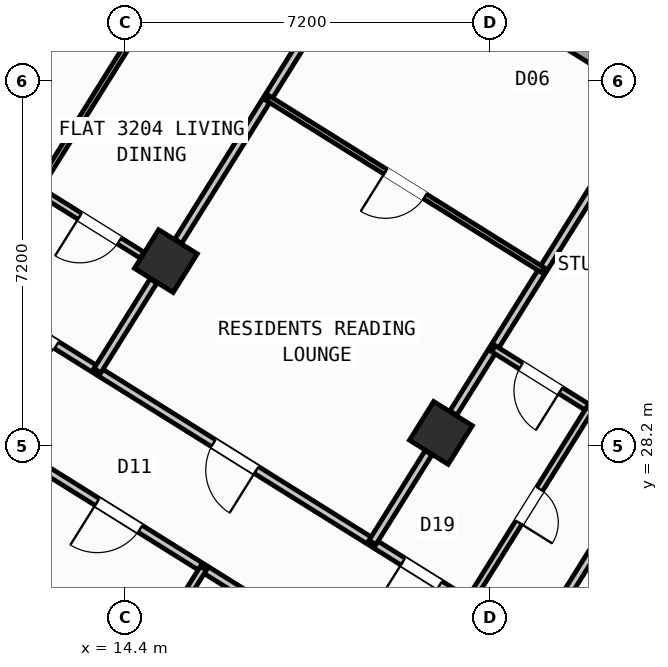
"""IFC4 building model, lengths in metres.
Left out: names, types, materials, properties, quantities, classifications, styles, units other than length and angle.
Written with IfcOpenShell. Run it as: python <this file> out.ifc"""

import sys

from ifc_helpers import new_model, si_unit, direction, frame, frame_2d, origin, origin_2d, place, context, subcontext, project, spatial, rectangle, hollow_rectangle, extrude, source, transform, mapped, element, fill, save


model = new_model("IFC4")
c1 = context("Model", 3, precision=1e-05, world=origin(), true_north=direction((0.0, 1.0)))
c2 = subcontext(c1, "Body", "Model", "MODEL_VIEW")
j1 = project(units=[si_unit("LENGTHUNIT", "METRE"), si_unit("PLANEANGLEUNIT", "RADIAN")], contexts=[c1])
p1 = place(None, origin())
s1 = spatial("IfcSite", under=j1, at=p1, CompositionType="ELEMENT")
p2 = place(p1, origin())
s2 = spatial("IfcBuilding", under=s1, at=p2, CompositionType="ELEMENT")
p3 = place(p2, frame((0.0, 0.0, 127.8)))
s3 = spatial("IfcBuildingStorey", under=s2, at=p3, CompositionType="ELEMENT", Elevation=127.8)
m1 = source(origin(), c2, "Body", "SweptSolid", [
    extrude(hollow_rectangle(XDim=0.9, YDim=0.9, WallThickness=0.036, at=origin_2d()), origin(), (0.0, 0.0, 1.0), 4.8),
])
for number, where, z_axis, x_axis in (
    (1, (20.632, 28.452, 0.0), (0.0, 0.0, 1.0), (-0.848, 0.53, 0.0)),
    (2, (15.205, 31.844, 0.0), (0.0, 0.0, 1.0), (-0.848, 0.53, 0.0)),
):
    element("IfcColumn", number, at=place(p3, frame(where, z_axis=z_axis, x_axis=x_axis)), inside=s3, PredefinedType="COLUMN", context=c2, shape_type="MappedRepresentation", body=[
        mapped(m1, transform((0.0, 0.0, 0.0), scale=1.0)),
    ])
p4 = place(p3, frame((2.415, 23.452, 0.0), z_axis=(0.0, 0.0, 1.0), x_axis=(0.52991049553, 0.848053575387, 0.0)))
e3 = element("IfcWall", 3, at=p4, inside=s3, PredefinedType="STANDARD", context=c2, shape_type="SweptSolid", body=[
    extrude(rectangle(XDim=21.587, YDim=0.32, at=frame_2d((10.794, 0.0))), origin(), (0.0, 0.0, 1.0), 3.975),
])
p5 = place(p4, frame((16.344, 0.0, 0.75)))
e4 = element("IfcOpeningElement", 4, at=p5, cuts=e3, PredefinedType="OPENING", context=c2, shape_type="SweptSolid", body=[
    extrude(rectangle(XDim=2.4, YDim=1.6, at=frame_2d((1.2, 0.8))), frame((0.0, 0.17, 0.0), z_axis=(0.0, -1.0, 0.0), x_axis=(1.0, 0.0, 0.0)), (0.0, 0.0, 1.0), 0.34),
])
p6 = place(p3, frame((14.138, 41.825, 0.0), z_axis=(0.0, 0.0, 1.0), x_axis=(0.848046498049, -0.529921821731, 0.0)))
e5 = element("IfcWall", 5, at=p6, inside=s3, PredefinedType="STANDARD", context=c2, shape_type="SweptSolid", body=[
    extrude(rectangle(XDim=31.588, YDim=0.32, at=frame_2d((15.794, 0.0))), origin(), (0.0, 0.0, 1.0), 4.55),
])
p7 = place(p6, frame((9.69, 0.0, 0.0)))
e6 = element("IfcOpeningElement", 6, at=p7, cuts=e5, PredefinedType="OPENING", context=c2, shape_type="SweptSolid", body=[
    extrude(rectangle(XDim=1.05, YDim=2.15, at=frame_2d((0.525, 1.075))), frame((0.0, 0.17, 0.0), z_axis=(0.0, -1.0, 0.0), x_axis=(1.0, 0.0, 0.0)), (0.0, 0.0, 1.0), 0.34),
])
p8 = place(p6, frame((14.666, 0.0, 0.0)))
e7 = element("IfcOpeningElement", 7, at=p8, cuts=e5, PredefinedType="OPENING", context=c2, shape_type="SweptSolid", body=[
    extrude(rectangle(XDim=1.5, YDim=2.25, at=frame_2d((0.75, 1.125))), frame((0.0, 0.17, 0.0), z_axis=(0.0, -1.0, 0.0), x_axis=(1.0, 0.0, 0.0)), (0.0, 0.0, 1.0), 0.34),
])
p9 = place(p6, frame((0.791, 0.0, 0.85)))
e8 = element("IfcOpeningElement", 8, at=p9, cuts=e5, PredefinedType="OPENING", context=c2, shape_type="SweptSolid", body=[
    extrude(rectangle(XDim=1.8, YDim=1.5, at=frame_2d((0.9, 0.75))), frame((0.0, 0.17, 0.0), z_axis=(0.0, -1.0, 0.0), x_axis=(1.0, 0.0, 0.0)), (0.0, 0.0, 1.0), 0.34),
])
p10 = place(p6, frame((3.996, 0.0, 0.95)))
e9 = element("IfcOpeningElement", 9, at=p10, cuts=e5, PredefinedType="OPENING", context=c2, shape_type="SweptSolid", body=[
    extrude(rectangle(XDim=1.2, YDim=1.4, at=frame_2d((0.6, 0.7))), frame((0.0, 0.17, 0.0), z_axis=(0.0, -1.0, 0.0), x_axis=(1.0, 0.0, 0.0)), (0.0, 0.0, 1.0), 0.34),
])
p11 = place(p6, frame((7.582, 0.0, 0.95)))
e10 = element("IfcOpeningElement", 10, at=p11, cuts=e5, PredefinedType="OPENING", context=c2, shape_type="SweptSolid", body=[
    extrude(rectangle(XDim=1.2, YDim=1.4, at=frame_2d((0.6, 0.7))), frame((0.0, 0.17, 0.0), z_axis=(0.0, -1.0, 0.0), x_axis=(1.0, 0.0, 0.0)), (0.0, 0.0, 1.0), 0.34),
])
p12 = place(p6, frame((21.381, 0.0, 0.75)))
e11 = element("IfcOpeningElement", 11, at=p12, cuts=e5, PredefinedType="OPENING", context=c2, shape_type="SweptSolid", body=[
    extrude(rectangle(XDim=2.4, YDim=1.6, at=frame_2d((1.2, 0.8))), frame((0.0, 0.17, 0.0), z_axis=(0.0, -1.0, 0.0), x_axis=(1.0, 0.0, 0.0)), (0.0, 0.0, 1.0), 0.34),
])
p13 = place(p6, frame((26.956, 0.0, 0.75)))
e12 = element("IfcOpeningElement", 12, at=p13, cuts=e5, PredefinedType="OPENING", context=c2, shape_type="SweptSolid", body=[
    extrude(rectangle(XDim=2.4, YDim=1.6, at=frame_2d((1.2, 0.8))), frame((0.0, 0.17, 0.0), z_axis=(0.0, -1.0, 0.0), x_axis=(1.0, 0.0, 0.0)), (0.0, 0.0, 1.0), 0.34),
])
p14 = place(p3, frame((27.953, 33.016, 0.0), z_axis=(0.0, 0.0, 1.0), x_axis=(-0.529909450694, -0.848054228257, 0.0)))
e13 = element("IfcWall", 13, at=p14, inside=s3, PredefinedType="PARTITIONING", context=c2, shape_type="SweptSolid", body=[
    extrude(rectangle(XDim=10.3, YDim=0.16, at=frame_2d((5.15, 0.0))), origin(), (0.0, 0.0, 1.0), 4.54),
])
p15 = place(p3, frame((22.495, 24.281, 0.0), z_axis=(0.0, 0.0, 1.0), x_axis=(-0.848052408131, 0.529912363569, 0.0)))
e14 = element("IfcWall", 14, at=p15, inside=s3, PredefinedType="PARTITIONING", context=c2, shape_type="SweptSolid", body=[
    extrude(rectangle(XDim=16.73, YDim=0.16, at=frame_2d((8.365, 0.0))), origin(), (0.0, 0.0, 1.0), 4.54),
])
p16 = place(p15, frame((2.22, 0.0, 0.0)))
e15 = element("IfcOpeningElement", 15, at=p16, cuts=e14, PredefinedType="OPENING", context=c2, shape_type="SweptSolid", body=[
    extrude(rectangle(XDim=0.86, YDim=2.05, at=frame_2d((0.43, 1.025))), frame((0.0, 0.09, 0.0), z_axis=(0.0, -1.0, 0.0), x_axis=(1.0, 0.0, 0.0)), (0.0, 0.0, 1.0), 0.18),
])
p17 = place(p15, frame((6.49, 0.0, 0.0)))
e16 = element("IfcOpeningElement", 16, at=p17, cuts=e14, PredefinedType="OPENING", context=c2, shape_type="SweptSolid", body=[
    extrude(rectangle(XDim=1.0, YDim=2.1, at=frame_2d((0.5, 1.05))), frame((0.0, 0.09, 0.0), z_axis=(0.0, -1.0, 0.0), x_axis=(1.0, 0.0, 0.0)), (0.0, 0.0, 1.0), 0.18),
])
p18 = place(p15, frame((11.14, 0.0, 0.0)))
e17 = element("IfcOpeningElement", 17, at=p18, cuts=e14, PredefinedType="OPENING", context=c2, shape_type="SweptSolid", body=[
    extrude(rectangle(XDim=1.0, YDim=2.1, at=frame_2d((0.5, 1.05))), frame((0.0, 0.09, 0.0), z_axis=(0.0, -1.0, 0.0), x_axis=(1.0, 0.0, 0.0)), (0.0, 0.0, 1.0), 0.18),
])
p19 = place(p3, frame((21.329, 22.416, 0.0), z_axis=(0.0, 0.0, 1.0), x_axis=(-0.848052408131, 0.529912363569, 0.0)))
e18 = element("IfcWall", 18, at=p19, inside=s3, PredefinedType="PARTITIONING", context=c2, shape_type="SweptSolid", body=[
    extrude(rectangle(XDim=16.73, YDim=0.16, at=frame_2d((8.365, 0.0))), origin(), (0.0, 0.0, 1.0), 4.54),
])
p20 = place(p19, frame((1.395, 0.0, 0.0)))
e19 = element("IfcOpeningElement", 19, at=p20, cuts=e18, PredefinedType="OPENING", context=c2, shape_type="SweptSolid", body=[
    extrude(rectangle(XDim=1.0, YDim=2.1, at=frame_2d((0.5, 1.05))), frame((0.0, 0.09, 0.0), z_axis=(0.0, -1.0, 0.0), x_axis=(1.0, 0.0, 0.0)), (0.0, 0.0, 1.0), 0.18),
])
p21 = place(p19, frame((7.82, 0.0, 0.0)))
e20 = element("IfcOpeningElement", 20, at=p21, cuts=e18, PredefinedType="OPENING", context=c2, shape_type="SweptSolid", body=[
    extrude(rectangle(XDim=1.0, YDim=2.1, at=frame_2d((0.5, 1.05))), frame((0.0, 0.09, 0.0), z_axis=(0.0, -1.0, 0.0), x_axis=(1.0, 0.0, 0.0)), (0.0, 0.0, 1.0), 0.18),
])
p22 = place(p19, frame((14.76, 0.0, 0.0)))
e21 = element("IfcOpeningElement", 21, at=p22, cuts=e18, PredefinedType="OPENING", context=c2, shape_type="SweptSolid", body=[
    extrude(rectangle(XDim=1.0, YDim=2.1, at=frame_2d((0.5, 1.05))), frame((0.0, 0.09, 0.0), z_axis=(0.0, -1.0, 0.0), x_axis=(1.0, 0.0, 0.0)), (0.0, 0.0, 1.0), 0.18),
])
p23 = place(p3, frame((15.944, 25.781, 0.0), z_axis=(0.0, 0.0, 1.0), x_axis=(-0.529917480809, -0.848049210561, 0.0)))
e22 = element("IfcWall", 22, at=p23, inside=s3, PredefinedType="PLUMBINGWALL", context=c2, shape_type="SweptSolid", body=[
    extrude(rectangle(XDim=4.58, YDim=0.14, at=frame_2d((2.29, 0.0))), origin(), (0.0, 0.0, 1.0), 4.54),
])
p24 = place(p23, frame((1.9, 0.0, 0.0)))
e23 = element("IfcOpeningElement", 23, at=p24, cuts=e22, PredefinedType="OPENING", context=c2, shape_type="SweptSolid", body=[
    extrude(rectangle(XDim=0.78, YDim=2.05, at=frame_2d((0.39, 1.025))), frame((0.0, 0.08, 0.0), z_axis=(0.0, -1.0, 0.0), x_axis=(1.0, 0.0, 0.0)), (0.0, 0.0, 1.0), 0.16),
])
p25 = place(p3, frame((24.256, 34.251, 0.0), z_axis=(0.0, 0.0, 1.0), x_axis=(-0.529919772691, -0.848047778437, 0.0)))
e24 = element("IfcWall", 24, at=p25, inside=s3, PredefinedType="PARTITIONING", context=c2, shape_type="SweptSolid", body=[
    extrude(rectangle(XDim=6.376, YDim=0.16, at=frame_2d((3.188, 0.0))), origin(), (0.0, 0.0, 1.0), 3.975),
])
p26 = place(p3, frame((20.387, 28.06, 0.0), z_axis=(0.0, 0.0, 1.0), x_axis=(-0.529904345651, -0.848057418139, 0.0)))
e25 = element("IfcWall", 25, at=p26, inside=s3, PredefinedType="PARTITIONING", context=c2, shape_type="SweptSolid", body=[
    extrude(rectangle(XDim=2.088, YDim=0.16, at=frame_2d((1.044, 0.0))), origin(), (0.0, 0.0, 1.0), 3.975),
])
p27 = place(p3, frame((24.885, 28.106, 0.0), z_axis=(0.0, 0.0, 1.0), x_axis=(-0.848059820872, 0.529900500304, 0.0)))
e26 = element("IfcWall", 26, at=p27, inside=s3, PredefinedType="PLUMBINGWALL", context=c2, shape_type="SweptSolid", body=[
    extrude(rectangle(XDim=3.79, YDim=0.14, at=frame_2d((1.895, 0.0))), origin(), (0.0, 0.0, 1.0), 4.54),
])
p28 = place(p27, frame((2.23, 0.0, 0.0)))
e27 = element("IfcOpeningElement", 27, at=p28, cuts=e26, PredefinedType="OPENING", context=c2, shape_type="SweptSolid", body=[
    extrude(rectangle(XDim=0.92, YDim=2.08, at=frame_2d((0.46, 1.04))), frame((0.0, 0.08, 0.0), z_axis=(0.0, -1.0, 0.0), x_axis=(1.0, 0.0, 0.0)), (0.0, 0.0, 1.0), 0.16),
])
p29 = place(p3, frame((23.57, 28.927, 0.0), z_axis=(0.0, 0.0, 1.0), x_axis=(-0.529911350634, -0.84805304107, 0.0)))
e28 = element("IfcWall", 28, at=p29, inside=s3, PredefinedType="PLUMBINGWALL", context=c2, shape_type="SweptSolid", body=[
    extrude(rectangle(XDim=4.51, YDim=0.14, at=frame_2d((2.255, 0.0))), origin(), (0.0, 0.0, 1.0), 4.195),
])
p30 = place(p29, frame((1.865, 0.0, 0.0)))
e29 = element("IfcOpeningElement", 29, at=p30, cuts=e28, PredefinedType="OPENING", context=c2, shape_type="SweptSolid", body=[
    extrude(rectangle(XDim=0.78, YDim=2.05, at=frame_2d((0.39, 1.025))), frame((0.0, 0.08, 0.0), z_axis=(0.0, -1.0, 0.0), x_axis=(1.0, 0.0, 0.0)), (0.0, 0.0, 1.0), 0.16),
])
p31 = place(p3, frame((18.828, 37.643, 0.0), z_axis=(0.0, 0.0, 1.0), x_axis=(-0.529930102756, -0.848041323399, 0.0)))
e30 = element("IfcWall", 30, at=p31, inside=s3, PredefinedType="PARTITIONING", context=c2, shape_type="SweptSolid", body=[
    extrude(rectangle(XDim=6.376, YDim=0.16, at=frame_2d((3.188, 0.0))), origin(), (0.0, 0.0, 1.0), 3.975),
])
p32 = place(p3, frame((14.96, 31.452, 0.0), z_axis=(0.0, 0.0, 1.0), x_axis=(-0.529956894714, -0.848024580862, 0.0)))
e31 = element("IfcWall", 31, at=p32, inside=s3, PredefinedType="PARTITIONING", context=c2, shape_type="SweptSolid", body=[
    extrude(rectangle(XDim=2.088, YDim=0.16, at=frame_2d((1.044, 0.0))), origin(), (0.0, 0.0, 1.0), 3.975),
])
p33 = place(p3, frame((22.642, 31.668, 0.0), z_axis=(0.0, 0.0, 1.0), x_axis=(-0.84806687439, 0.529889211593, 0.0)))
e32 = element("IfcWall", 32, at=p33, inside=s3, PredefinedType="PARTITIONING", context=c2, shape_type="SweptSolid", body=[
    extrude(rectangle(XDim=6.4, YDim=0.11, at=frame_2d((3.2, 0.0))), origin(), (0.0, 0.0, 1.0), 4.54),
])
p34 = place(p33, frame((2.74, 0.0, 0.0)))
e33 = element("IfcOpeningElement", 33, at=p34, cuts=e32, PredefinedType="OPENING", context=c2, shape_type="SweptSolid", body=[
    extrude(rectangle(XDim=0.92, YDim=2.08, at=frame_2d((0.46, 1.04))), frame((0.0, 0.065, 0.0), z_axis=(0.0, -1.0, 0.0), x_axis=(1.0, 0.0, 0.0)), (0.0, 0.0, 1.0), 0.13),
])
p35 = place(p3, frame((16.995, 40.182, 0.0), z_axis=(0.0, 0.0, 1.0), x_axis=(-0.529924195719, -0.848045014602, 0.0)))
e34 = element("IfcWall", 34, at=p35, inside=s3, PredefinedType="PARTITIONING", context=c2, shape_type="SweptSolid", body=[
    extrude(rectangle(XDim=10.57, YDim=0.11, at=frame_2d((5.285, 0.0))), origin(), (0.0, 0.0, 1.0), 4.54),
])
p36 = place(p35, frame((8.93, 0.0, 0.0)))
e35 = element("IfcOpeningElement", 35, at=p36, cuts=e34, PredefinedType="OPENING", context=c2, shape_type="SweptSolid", body=[
    extrude(rectangle(XDim=0.78, YDim=2.05, at=frame_2d((0.39, 1.025))), frame((0.0, 0.065, 0.0), z_axis=(0.0, -1.0, 0.0), x_axis=(1.0, 0.0, 0.0)), (0.0, 0.0, 1.0), 0.13),
])
p37 = place(p35, frame((3.625, 0.0, 0.0)))
e36 = element("IfcOpeningElement", 36, at=p37, cuts=e34, PredefinedType="OPENING", context=c2, shape_type="SweptSolid", body=[
    extrude(rectangle(XDim=0.92, YDim=2.08, at=frame_2d((0.46, 1.04))), frame((0.0, 0.065, 0.0), z_axis=(0.0, -1.0, 0.0), x_axis=(1.0, 0.0, 0.0)), (0.0, 0.0, 1.0), 0.13),
])
p38 = place(p3, frame((14.733, 31.961, 0.0), z_axis=(0.0, 0.0, 1.0), x_axis=(-0.848020807548, 0.529962932634, 0.0)))
e37 = element("IfcWall", 37, at=p38, inside=s3, PredefinedType="PLUMBINGWALL", context=c2, shape_type="SweptSolid", body=[
    extrude(rectangle(XDim=2.438, YDim=0.14, at=frame_2d((1.219, 0.0))), origin(), (0.0, 0.0, 1.0), 3.975),
])
p39 = place(p38, frame((0.528, 0.0, 0.0)))
e38 = element("IfcOpeningElement", 38, at=p39, cuts=e37, PredefinedType="OPENING", context=c2, shape_type="SweptSolid", body=[
    extrude(rectangle(XDim=0.92, YDim=2.08, at=frame_2d((0.46, 1.04))), frame((0.0, 0.08, 0.0), z_axis=(0.0, -1.0, 0.0), x_axis=(1.0, 0.0, 0.0)), (0.0, 0.0, 1.0), 0.16),
])
m2 = source(origin(), c2, "Body", "SweptSolid", [
    extrude(rectangle(XDim=1.0, YDim=2.1, at=frame_2d((0.5, 1.05))), frame((0.0, 0.025, 0.0), z_axis=(0.0, -1.0, 0.0), x_axis=(1.0, 0.0, 0.0)), (0.0, 0.0, 1.0), 0.05),
])
p40 = place(p21, origin())
e39 = element("IfcDoor", 39, at=p40, inside=s3, OperationType="SINGLE_SWING_RIGHT", PredefinedType="DOOR", context=c2, shape_type="MappedRepresentation", body=[
    mapped(m2, transform((0.0, 0.0, 0.0), scale=1.0)),
])
fill(e20, e39)
m3 = source(origin(), c2, "Body", "SweptSolid", [
    extrude(rectangle(XDim=0.86, YDim=2.05, at=frame_2d((0.43, 1.025))), frame((0.0, 0.025, 0.0), z_axis=(0.0, -1.0, 0.0), x_axis=(1.0, 0.0, 0.0)), (0.0, 0.0, 1.0), 0.05),
])
p41 = place(p16, origin())
e40 = element("IfcDoor", 40, at=p41, inside=s3, OperationType="SINGLE_SWING_RIGHT", PredefinedType="DOOR", context=c2, shape_type="MappedRepresentation", body=[
    mapped(m3, transform((0.0, 0.0, 0.0), scale=1.0)),
])
fill(e15, e40)
m4 = source(origin(), c2, "Body", "SweptSolid", [
    extrude(rectangle(XDim=0.92, YDim=2.08, at=frame_2d((0.46, 1.04))), frame((0.0, 0.025, 0.0), z_axis=(0.0, -1.0, 0.0), x_axis=(1.0, 0.0, 0.0)), (0.0, 0.0, 1.0), 0.05),
])
p42 = place(p28, origin())
e41 = element("IfcDoor", 41, at=p42, inside=s3, OperationType="SINGLE_SWING_LEFT", PredefinedType="DOOR", context=c2, shape_type="MappedRepresentation", body=[
    mapped(m4, transform((0.0, 0.0, 0.0), scale=1.0)),
])
fill(e27, e41)
m5 = source(origin(), c2, "Body", "SweptSolid", [
    extrude(rectangle(XDim=0.78, YDim=2.05, at=frame_2d((0.39, 1.025))), frame((0.0, 0.025, 0.0), z_axis=(0.0, -1.0, 0.0), x_axis=(1.0, 0.0, 0.0)), (0.0, 0.0, 1.0), 0.05),
])
p43 = place(p30, origin())
e42 = element("IfcDoor", 42, at=p43, inside=s3, OperationType="SINGLE_SWING_RIGHT", PredefinedType="DOOR", context=c2, shape_type="MappedRepresentation", body=[
    mapped(m5, transform((0.0, 0.0, 0.0), scale=1.0)),
])
fill(e29, e42)
p44 = place(p17, origin())
e43 = element("IfcDoor", 43, at=p44, inside=s3, OperationType="SINGLE_SWING_LEFT", PredefinedType="DOOR", context=c2, shape_type="MappedRepresentation", body=[
    mapped(m2, transform((0.0, 0.0, 0.0), scale=1.0)),
])
fill(e16, e43)
p45 = place(p34, origin())
e44 = element("IfcDoor", 44, at=p45, inside=s3, OperationType="SINGLE_SWING_RIGHT", PredefinedType="DOOR", context=c2, shape_type="MappedRepresentation", body=[
    mapped(m4, transform((0.0, 0.0, 0.0), scale=1.0)),
])
fill(e33, e44)
p46 = place(p18, origin())
e45 = element("IfcDoor", 45, at=p46, inside=s3, OperationType="SINGLE_SWING_RIGHT", PredefinedType="DOOR", context=c2, shape_type="MappedRepresentation", body=[
    mapped(m2, transform((0.0, 0.0, 0.0), scale=1.0)),
])
fill(e17, e45)
p47 = place(p39, origin())
e46 = element("IfcDoor", 46, at=p47, inside=s3, OperationType="SINGLE_SWING_RIGHT", PredefinedType="DOOR", context=c2, shape_type="MappedRepresentation", body=[
    mapped(m4, transform((0.0, 0.0, 0.0), scale=1.0)),
])
fill(e38, e46)
save(model, sys.argv[1])
